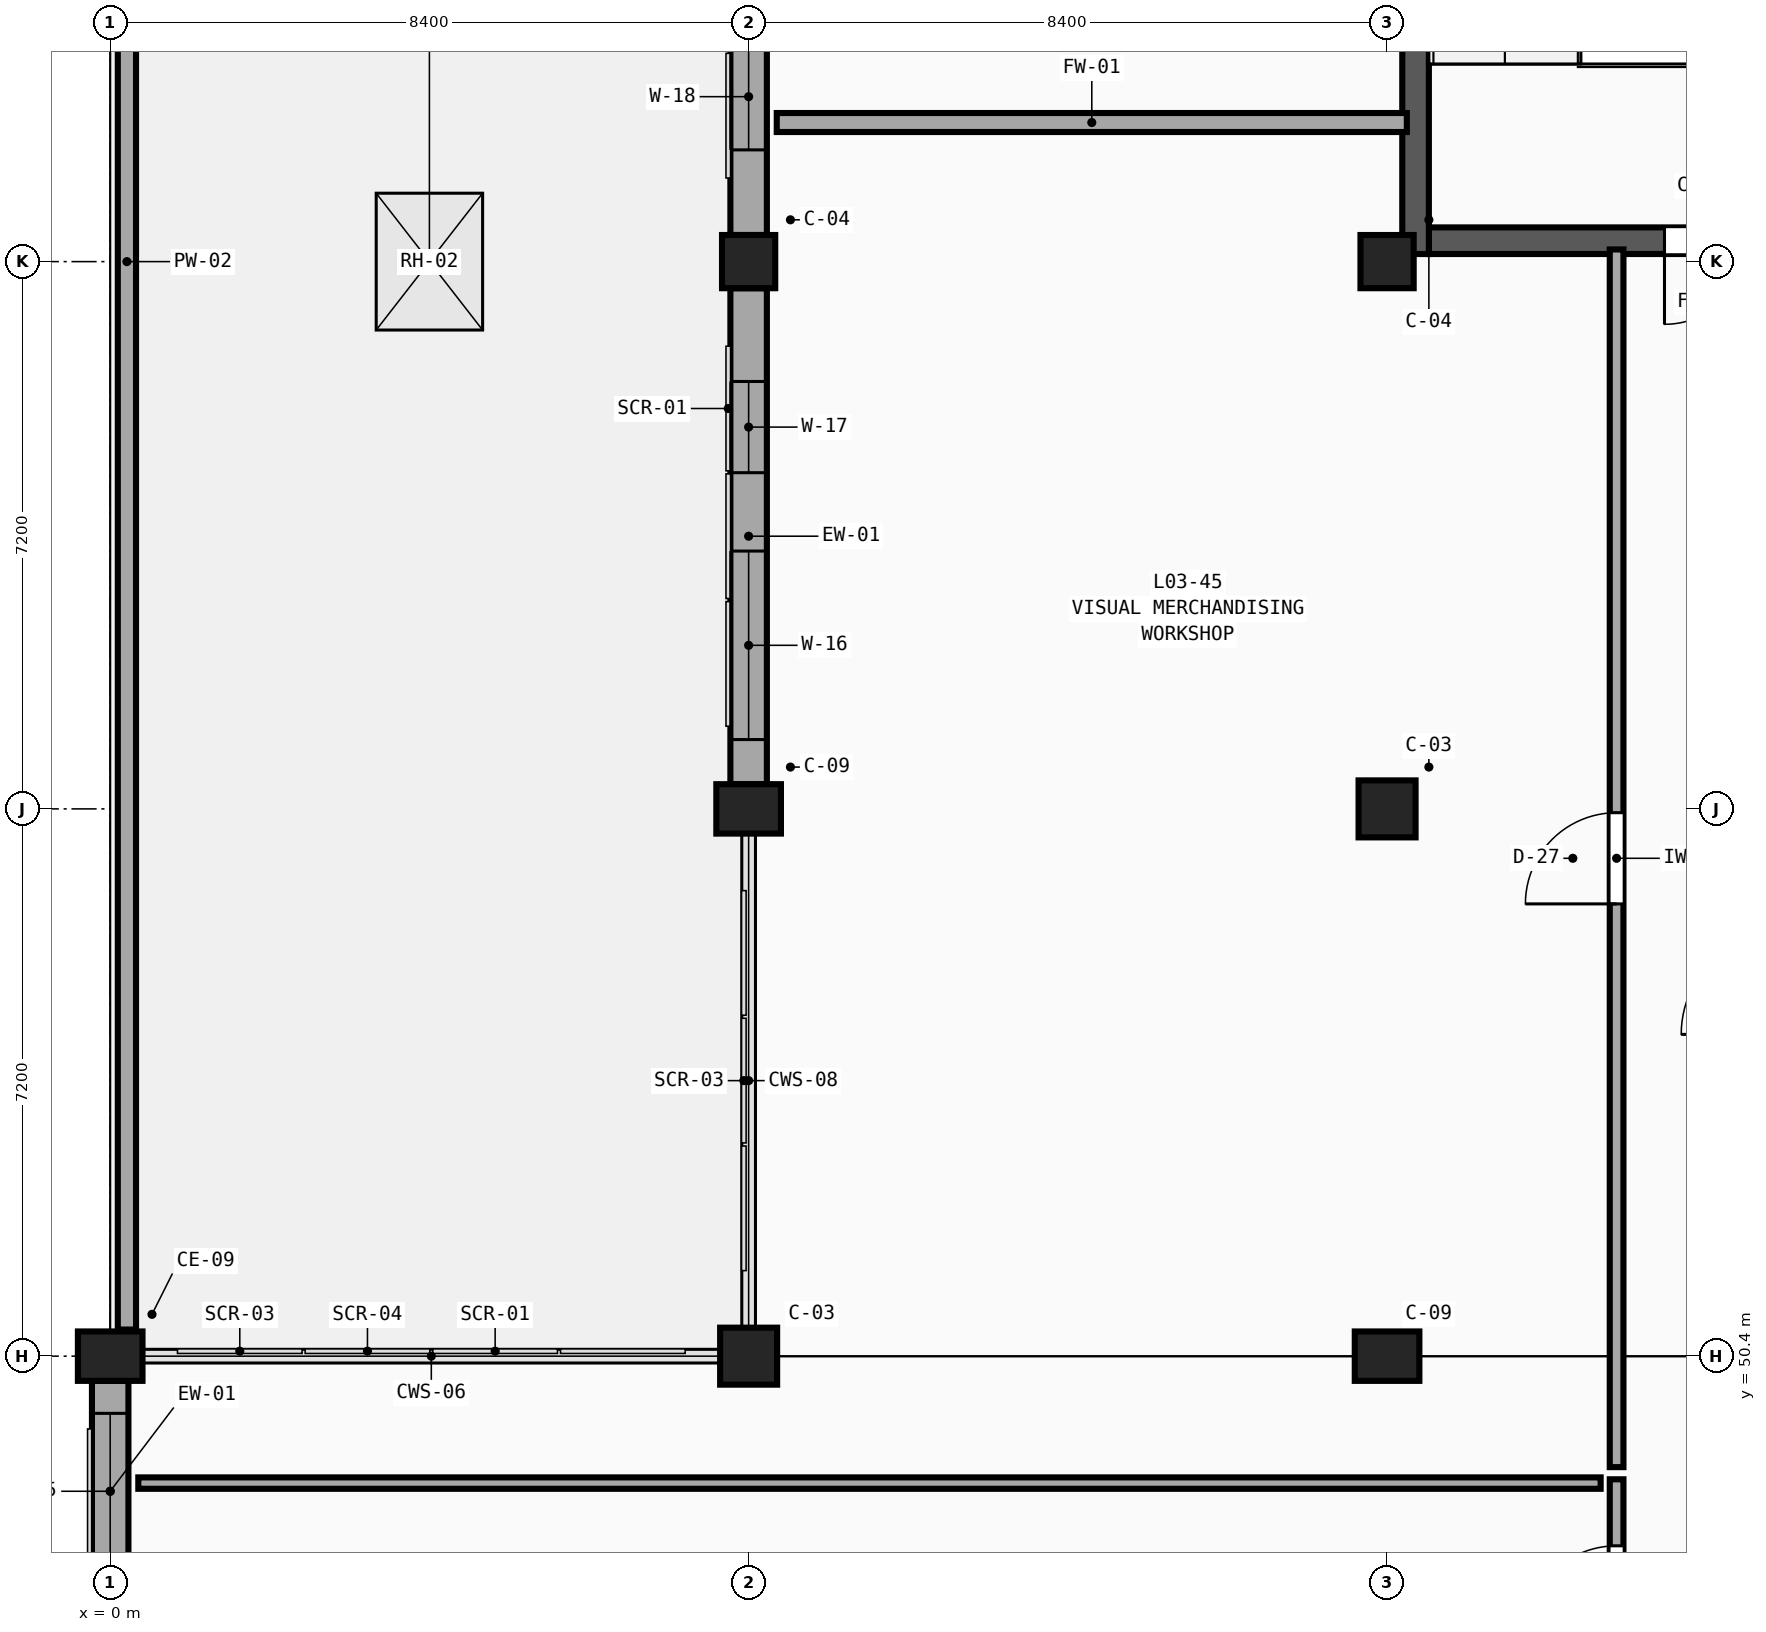
"""IFC4 building model, lengths in metres.
Left out: names, types, materials, properties, quantities, classifications, styles, units other than length and angle.
Written with IfcOpenShell. Run it as: python <this file> out.ifc"""

import sys

from ifc_helpers import new_model, si_unit, direction, frame, frame_2d, origin, origin_2d, place, context, subcontext, project, spatial, rectangle, extrude, element, fill, save


model = new_model("IFC4")
c1 = context("Model", 3, precision=1e-05, world=origin(), true_north=direction((0.0, 1.0)))
c2 = subcontext(c1, "Body", "Model", "MODEL_VIEW")
j1 = project(units=[si_unit("LENGTHUNIT", "METRE"), si_unit("PLANEANGLEUNIT", "RADIAN")], contexts=[c1])
p1 = place(None, origin())
s1 = spatial("IfcSite", under=j1, at=p1, CompositionType="ELEMENT")
p2 = place(p1, origin())
s2 = spatial("IfcBuilding", under=s1, at=p2, CompositionType="ELEMENT")
p3 = place(p2, frame((0.0, 0.0, 14.4)))
s3 = spatial("IfcBuildingStorey", under=s2, at=p3, CompositionType="ELEMENT", Elevation=14.4)
p4 = place(p3, frame((0.0, 50.4, 0.0), z_axis=(0.0, 0.0, 1.0), x_axis=(1.0, 0.0, 0.0)))
e1 = element("IfcColumn", 1, at=p4, inside=s3, PredefinedType="COLUMN", context=c2, shape_type="SweptSolid", body=[
    extrude(rectangle(XDim=0.85, YDim=0.65, at=origin_2d()), origin(), (0.0, 0.0, 1.0), 4.5),
])
p5 = place(p3, frame((8.4, 50.4, 0.0), z_axis=(0.0, 0.0, 1.0), x_axis=(1.0, 0.0, 0.0)))
e2 = element("IfcColumn", 2, at=p5, inside=s3, PredefinedType="COLUMN", context=c2, shape_type="SweptSolid", body=[
    extrude(rectangle(XDim=0.75, YDim=0.75, at=origin_2d()), origin(), (0.0, 0.0, 1.0), 4.5),
])
p6 = place(p3, frame((8.4, 57.6, 0.0), z_axis=(0.0, 0.0, 1.0), x_axis=(1.0, 0.0, 0.0)))
e3 = element("IfcColumn", 3, at=p6, inside=s3, PredefinedType="COLUMN", context=c2, shape_type="SweptSolid", body=[
    extrude(rectangle(XDim=0.85, YDim=0.65, at=origin_2d()), origin(), (0.0, 0.0, 1.0), 4.5),
])
p7 = place(p3, frame((8.4, 64.8, 0.0), z_axis=(0.0, 0.0, 1.0), x_axis=(1.0, 0.0, 0.0)))
e4 = element("IfcColumn", 4, at=p7, inside=s3, PredefinedType="COLUMN", context=c2, shape_type="SweptSolid", body=[
    extrude(rectangle(XDim=0.7, YDim=0.7, at=origin_2d()), origin(), (0.0, 0.0, 1.0), 4.5),
])
p8 = place(p3, frame((16.8, 50.4, 0.0), z_axis=(0.0, 0.0, 1.0), x_axis=(1.0, 0.0, 0.0)))
e5 = element("IfcColumn", 5, at=p8, inside=s3, PredefinedType="COLUMN", context=c2, shape_type="SweptSolid", body=[
    extrude(rectangle(XDim=0.85, YDim=0.65, at=origin_2d()), origin(), (0.0, 0.0, 1.0), 4.5),
])
p9 = place(p3, frame((16.8, 57.6, 0.0), z_axis=(0.0, 0.0, 1.0), x_axis=(1.0, 0.0, 0.0)))
e6 = element("IfcColumn", 6, at=p9, inside=s3, PredefinedType="COLUMN", context=c2, shape_type="SweptSolid", body=[
    extrude(rectangle(XDim=0.75, YDim=0.75, at=origin_2d()), origin(), (0.0, 0.0, 1.0), 4.5),
])
p10 = place(p3, frame((16.8, 64.8, 0.0), z_axis=(0.0, 0.0, 1.0), x_axis=(1.0, 0.0, 0.0)))
e7 = element("IfcColumn", 7, at=p10, inside=s3, PredefinedType="COLUMN", context=c2, shape_type="SweptSolid", body=[
    extrude(rectangle(XDim=0.7, YDim=0.7, at=origin_2d()), origin(), (0.0, 0.0, 1.0), 4.5),
])
p11 = place(p3, frame((0.0, 47.17, 0.0), z_axis=(0.0, 0.0, 1.0), x_axis=(0.0, 1.0, 0.0)))
e8 = element("IfcWall", 8, at=p11, inside=s3, PredefinedType="SOLIDWALL", context=c2, shape_type="SweptSolid", body=[
    extrude(rectangle(XDim=2.905, YDim=0.48, at=frame_2d((1.453, 0.0))), origin(), (0.0, 0.0, 1.0), 3.63),
])
p12 = place(p11, frame((0.427, 0.0, 0.75)))
e9 = element("IfcOpeningElement", 9, at=p12, cuts=e8, PredefinedType="OPENING", context=c2, shape_type="SweptSolid", body=[
    extrude(rectangle(XDim=2.05, YDim=2.08, at=frame_2d((1.025, 1.04))), frame((0.0, 0.26, 0.0), z_axis=(0.0, -1.0, 0.0), x_axis=(1.0, 0.0, 0.0)), (0.0, 0.0, 1.0), 0.52),
])
p13 = place(p3, frame((8.4, 57.925, 0.0), z_axis=(0.0, 0.0, 1.0), x_axis=(0.0, 1.0, 0.0)))
e10 = element("IfcWall", 10, at=p13, inside=s3, PredefinedType="SOLIDWALL", context=c2, shape_type="SweptSolid", body=[
    extrude(rectangle(XDim=6.525, YDim=0.48, at=frame_2d((3.262, 0.0))), origin(), (0.0, 0.0, 1.0), 3.63),
])
p14 = place(p13, frame((0.587, 0.0, 0.75)))
e11 = element("IfcOpeningElement", 11, at=p14, cuts=e10, PredefinedType="OPENING", context=c2, shape_type="SweptSolid", body=[
    extrude(rectangle(XDim=2.48, YDim=2.08, at=frame_2d((1.24, 1.04))), frame((0.0, 0.26, 0.0), z_axis=(0.0, -1.0, 0.0), x_axis=(1.0, 0.0, 0.0)), (0.0, 0.0, 1.0), 0.52),
])
p15 = place(p13, frame((4.098, 0.0, 0.75)))
e12 = element("IfcOpeningElement", 12, at=p15, cuts=e10, PredefinedType="OPENING", context=c2, shape_type="SweptSolid", body=[
    extrude(rectangle(XDim=1.2, YDim=2.26, at=frame_2d((0.6, 1.13))), frame((0.0, 0.26, 0.0), z_axis=(0.0, -1.0, 0.0), x_axis=(1.0, 0.0, 0.0)), (0.0, 0.0, 1.0), 0.52),
])
p16 = place(p3, frame((8.4, 65.15, 0.0), z_axis=(0.0, 0.0, 1.0), x_axis=(0.0, 1.0, 0.0)))
e13 = element("IfcWall", 13, at=p16, inside=s3, PredefinedType="SOLIDWALL", context=c2, shape_type="SweptSolid", body=[
    extrude(rectangle(XDim=6.5, YDim=0.48, at=frame_2d((3.25, 0.0))), origin(), (0.0, 0.0, 1.0), 3.63),
])
p17 = place(p16, frame((1.12, 0.0, 0.75)))
e14 = element("IfcOpeningElement", 14, at=p17, cuts=e13, PredefinedType="OPENING", context=c2, shape_type="SweptSolid", body=[
    extrude(rectangle(XDim=1.4, YDim=2.26, at=frame_2d((0.7, 1.13))), frame((0.0, 0.26, 0.0), z_axis=(0.0, -1.0, 0.0), x_axis=(1.0, 0.0, 0.0)), (0.0, 0.0, 1.0), 0.52),
])
p18 = place(p16, frame((3.88, 0.0, 0.75)))
e15 = element("IfcOpeningElement", 15, at=p18, cuts=e13, PredefinedType="OPENING", context=c2, shape_type="SweptSolid", body=[
    extrude(rectangle(XDim=1.6, YDim=2.26, at=frame_2d((0.8, 1.13))), frame((0.0, 0.26, 0.0), z_axis=(0.0, -1.0, 0.0), x_axis=(1.0, 0.0, 0.0)), (0.0, 0.0, 1.0), 0.52),
])
p19 = place(p3, frame((0.22, 50.75, 0.0), z_axis=(0.0, 0.0, 1.0), x_axis=(0.0, 1.0, 0.0)))
e16 = element("IfcWall", 16, at=p19, inside=s3, PredefinedType="PARAPET", context=c2, shape_type="SweptSolid", body=[
    extrude(rectangle(XDim=28.1, YDim=0.24, at=frame_2d((14.05, 0.0))), origin(), (0.0, 0.0, 1.0), 1.15),
])
p20 = place(p3, frame((24.65, 65.075, 0.0), z_axis=(0.0, 0.0, 1.0), x_axis=(-1.0, 0.0, 0.0)))
e17 = element("IfcWall", 17, at=p20, inside=s3, PredefinedType="SHEAR", context=c2, shape_type="SweptSolid", body=[
    extrude(rectangle(XDim=7.3, YDim=0.35, at=frame_2d((3.65, 0.0))), origin(), (0.0, 0.0, 1.0), 4.5),
])
p21 = place(p20, frame((3.1, 0.0, 0.0)))
e18 = element("IfcOpeningElement", 18, at=p21, cuts=e17, PredefinedType="OPENING", context=c2, shape_type="SweptSolid", body=[
    extrude(rectangle(XDim=1.1, YDim=2.2, at=frame_2d((0.55, 1.1))), frame((0.0, 0.195, 0.0), z_axis=(0.0, -1.0, 0.0), x_axis=(1.0, 0.0, 0.0)), (0.0, 0.0, 1.0), 0.39),
])
p22 = place(p3, frame((17.175, 73.05, 0.0), z_axis=(0.0, 0.0, 1.0), x_axis=(0.0, -1.0, 0.0)))
e19 = element("IfcWall", 19, at=p22, inside=s3, PredefinedType="SHEAR", context=c2, shape_type="SweptSolid", body=[
    extrude(rectangle(XDim=8.15, YDim=0.35, at=frame_2d((4.075, 0.0))), origin(), (0.0, 0.0, 1.0), 4.5),
])
p23 = place(p3, frame((19.82, 48.94, 0.0), z_axis=(0.0, 0.0, 1.0), x_axis=(0.0, 1.0, 0.0)))
e20 = element("IfcWall", 20, at=p23, inside=s3, PredefinedType="PARTITIONING", context=c2, shape_type="SweptSolid", body=[
    extrude(rectangle(XDim=16.02, YDim=0.18, at=frame_2d((8.01, 0.0))), origin(), (0.0, 0.0, 1.0), 4.18),
])
p24 = place(p23, frame((7.41, 0.0, 0.0)))
e21 = element("IfcOpeningElement", 21, at=p24, cuts=e20, PredefinedType="OPENING", context=c2, shape_type="SweptSolid", body=[
    extrude(rectangle(XDim=1.2, YDim=2.37, at=frame_2d((0.6, 1.185))), frame((0.0, 0.11, 0.0), z_axis=(0.0, -1.0, 0.0), x_axis=(1.0, 0.0, 0.0)), (0.0, 0.0, 1.0), 0.22),
])
p25 = place(p3, frame((19.82, 45.83, 0.0), z_axis=(0.0, 0.0, 1.0), x_axis=(0.0, 1.0, 0.0)))
e22 = element("IfcWall", 22, at=p25, inside=s3, PredefinedType="PARTITIONING", context=c2, shape_type="SweptSolid", body=[
    extrude(rectangle(XDim=2.95, YDim=0.18, at=frame_2d((1.475, 0.0))), origin(), (0.0, 0.0, 1.0), 4.18),
])
p26 = place(p25, frame((0.875, 0.0, 0.0)))
e23 = element("IfcOpeningElement", 23, at=p26, cuts=e22, PredefinedType="OPENING", context=c2, shape_type="SweptSolid", body=[
    extrude(rectangle(XDim=1.2, YDim=2.21, at=frame_2d((0.6, 1.105))), frame((0.0, 0.11, 0.0), z_axis=(0.0, -1.0, 0.0), x_axis=(1.0, 0.0, 0.0)), (0.0, 0.0, 1.0), 0.22),
])
p27 = place(p3, frame((0.37, 48.73, 0.0), z_axis=(0.0, 0.0, 1.0), x_axis=(1.0, 0.0, 0.0)))
e24 = element("IfcWall", 24, at=p27, inside=s3, PredefinedType="PARTITIONING", context=c2, shape_type="SweptSolid", body=[
    extrude(rectangle(XDim=19.24, YDim=0.15, at=frame_2d((9.62, 0.0))), origin(), (0.0, 0.0, 1.0), 4.18),
])
p28 = place(p3, frame((8.77, 66.63, 0.0), z_axis=(0.0, 0.0, 1.0), x_axis=(1.0, 0.0, 0.0)))
e25 = element("IfcWall", 25, at=p28, inside=s3, PredefinedType="SOLIDWALL", context=c2, shape_type="SweptSolid", body=[
    extrude(rectangle(XDim=8.29, YDim=0.25, at=frame_2d((4.145, 0.0))), origin(), (0.0, 0.0, 1.0), 4.18),
])
p29 = place(p12, origin())
e26 = element("IfcWindow", 26, at=p29, inside=s3, PartitioningType="TRIPLE_PANEL_VERTICAL", PredefinedType="WINDOW", context=c2, shape_type="SweptSolid", body=[
    extrude(rectangle(XDim=2.05, YDim=2.08, at=frame_2d((1.025, 1.04))), frame((0.0, 0.03, 0.0), z_axis=(0.0, -1.0, 0.0), x_axis=(1.0, 0.0, 0.0)), (0.0, 0.0, 1.0), 0.06),
])
fill(e9, e26)
p30 = place(p14, origin())
e27 = element("IfcWindow", 27, at=p30, inside=s3, PartitioningType="TRIPLE_PANEL_VERTICAL", PredefinedType="WINDOW", context=c2, shape_type="SweptSolid", body=[
    extrude(rectangle(XDim=2.48, YDim=2.08, at=frame_2d((1.24, 1.04))), frame((0.0, 0.03, 0.0), z_axis=(0.0, -1.0, 0.0), x_axis=(1.0, 0.0, 0.0)), (0.0, 0.0, 1.0), 0.06),
])
fill(e11, e27)
p31 = place(p15, origin())
e28 = element("IfcWindow", 28, at=p31, inside=s3, PartitioningType="SINGLE_PANEL", PredefinedType="WINDOW", context=c2, shape_type="SweptSolid", body=[
    extrude(rectangle(XDim=1.2, YDim=2.26, at=frame_2d((0.6, 1.13))), frame((0.0, 0.03, 0.0), z_axis=(0.0, -1.0, 0.0), x_axis=(1.0, 0.0, 0.0)), (0.0, 0.0, 1.0), 0.06),
])
fill(e12, e28)
p32 = place(p17, origin())
e29 = element("IfcWindow", 29, at=p32, inside=s3, PartitioningType="DOUBLE_PANEL_VERTICAL", PredefinedType="WINDOW", context=c2, shape_type="SweptSolid", body=[
    extrude(rectangle(XDim=1.4, YDim=2.26, at=frame_2d((0.7, 1.13))), frame((0.0, 0.03, 0.0), z_axis=(0.0, -1.0, 0.0), x_axis=(1.0, 0.0, 0.0)), (0.0, 0.0, 1.0), 0.06),
])
fill(e14, e29)
p33 = place(p3, frame((0.0, 0.0, -0.26)))
p34 = place(p33, frame((4.2, 64.8, 0.21)))
e30 = element("IfcWindow", 30, at=p34, inside=s3, PartitioningType="SINGLE_PANEL", PredefinedType="SKYLIGHT", context=c2, shape_type="SweptSolid", body=[
    extrude(rectangle(XDim=1.4, YDim=1.8, at=origin_2d()), origin(), (0.0, 0.0, 1.0), 0.05),
])
p35 = place(p21, origin())
e31 = element("IfcDoor", 31, at=p35, inside=s3, OperationType="SINGLE_SWING_RIGHT", PredefinedType="DOOR", context=c2, shape_type="SweptSolid", body=[
    extrude(rectangle(XDim=1.1, YDim=2.2, at=frame_2d((0.55, 1.1))), frame((0.0, 0.025, 0.0), z_axis=(0.0, -1.0, 0.0), x_axis=(1.0, 0.0, 0.0)), (0.0, 0.0, 1.0), 0.05),
])
fill(e18, e31)
p36 = place(p24, origin())
e32 = element("IfcDoor", 32, at=p36, inside=s3, OperationType="SINGLE_SWING_LEFT", PredefinedType="DOOR", context=c2, shape_type="SweptSolid", body=[
    extrude(rectangle(XDim=1.2, YDim=2.37, at=frame_2d((0.6, 1.185))), frame((0.0, 0.025, 0.0), z_axis=(0.0, -1.0, 0.0), x_axis=(1.0, 0.0, 0.0)), (0.0, 0.0, 1.0), 0.05),
])
fill(e21, e32)
p37 = place(p26, origin())
e33 = element("IfcDoor", 33, at=p37, inside=s3, OperationType="SINGLE_SWING_LEFT", PredefinedType="DOOR", context=c2, shape_type="SweptSolid", body=[
    extrude(rectangle(XDim=1.2, YDim=2.21, at=frame_2d((0.6, 1.105))), frame((0.0, 0.025, 0.0), z_axis=(0.0, -1.0, 0.0), x_axis=(1.0, 0.0, 0.0)), (0.0, 0.0, 1.0), 0.05),
])
fill(e23, e33)
save(model, sys.argv[1])
